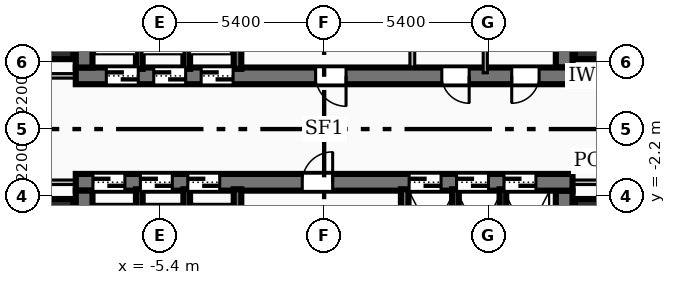
"""IFC4 building model, lengths in metres.
Left out: names, types, materials, properties, quantities, classifications, styles, units other than length and angle.
Written with IfcOpenShell. Run it as: python <this file> out.ifc"""

import sys

from ifc_helpers import new_model, si_unit, direction, frame, frame_2d, origin, origin_2d, place, context, subcontext, project, spatial, rectangle, extrude, element, fill, save


model = new_model("IFC4")
c1 = context("Model", 3, precision=1e-05, world=origin(), true_north=direction((0.0, 1.0)))
c2 = subcontext(c1, "Body", "Model", "MODEL_VIEW")
j1 = project(units=[si_unit("LENGTHUNIT", "METRE"), si_unit("PLANEANGLEUNIT", "RADIAN")], contexts=[c1])
p1 = place(None, origin())
s1 = spatial("IfcSite", under=j1, at=p1, CompositionType="ELEMENT")
p2 = place(p1, origin())
s2 = spatial("IfcBuilding", under=s1, at=p2, CompositionType="ELEMENT")
p3 = place(p2, origin())
s3 = spatial("IfcBuildingStorey", under=s2, at=p3, CompositionType="ELEMENT", Elevation=0.0)
p4 = place(p3, frame((8.17, 1.75, 0.0), z_axis=(0.0, 0.0, 1.0), x_axis=(-1.0, 0.0, 0.0)))
e1 = element("IfcWall", 1, at=p4, inside=s3, PredefinedType="SHEAR", context=c2, shape_type="SweptSolid", body=[
    extrude(rectangle(XDim=16.34, YDim=0.55, at=frame_2d((8.17, 0.0))), origin(), (0.0, 0.0, 1.0), 5.08),
])
p5 = place(p4, frame((7.45, 0.0, 0.0)))
e2 = element("IfcOpeningElement", 2, at=p5, cuts=e1, PredefinedType="OPENING", context=c2, shape_type="SweptSolid", body=[
    extrude(rectangle(XDim=1.0, YDim=2.1, at=frame_2d((0.5, 1.05))), frame((0.0, 0.285, 0.0), z_axis=(0.0, -1.0, 0.0), x_axis=(1.0, 0.0, 0.0)), (0.0, 0.0, 1.0), 0.57),
])
p6 = place(p4, frame((14.285, 0.0, 0.0)))
e3 = element("IfcOpeningElement", 3, at=p6, cuts=e1, PredefinedType="OPENING", context=c2, shape_type="SweptSolid", body=[
    extrude(rectangle(XDim=1.05, YDim=2.15, at=frame_2d((0.525, 1.075))), frame((0.0, 0.285, 0.0), z_axis=(0.0, -1.0, 0.0), x_axis=(1.0, 0.0, 0.0)), (0.0, 0.0, 1.0), 0.57),
])
p7 = place(p4, frame((12.725, 0.0, 0.0)))
e4 = element("IfcOpeningElement", 4, at=p7, cuts=e1, PredefinedType="OPENING", context=c2, shape_type="SweptSolid", body=[
    extrude(rectangle(XDim=1.05, YDim=2.15, at=frame_2d((0.525, 1.075))), frame((0.0, 0.285, 0.0), z_axis=(0.0, -1.0, 0.0), x_axis=(1.0, 0.0, 0.0)), (0.0, 0.0, 1.0), 0.57),
])
p8 = place(p4, frame((11.165, 0.0, 0.0)))
e5 = element("IfcOpeningElement", 5, at=p8, cuts=e1, PredefinedType="OPENING", context=c2, shape_type="SweptSolid", body=[
    extrude(rectangle(XDim=1.05, YDim=2.15, at=frame_2d((0.525, 1.075))), frame((0.0, 0.285, 0.0), z_axis=(0.0, -1.0, 0.0), x_axis=(1.0, 0.0, 0.0)), (0.0, 0.0, 1.0), 0.57),
])
p9 = place(p4, frame((3.4, 0.0, 0.0)))
e6 = element("IfcOpeningElement", 6, at=p9, cuts=e1, PredefinedType="OPENING", context=c2, shape_type="SweptSolid", body=[
    extrude(rectangle(XDim=0.9, YDim=2.06, at=frame_2d((0.45, 1.03))), frame((0.0, 0.285, 0.0), z_axis=(0.0, -1.0, 0.0), x_axis=(1.0, 0.0, 0.0)), (0.0, 0.0, 1.0), 0.57),
])
p10 = place(p4, frame((1.1, 0.0, 0.0)))
e7 = element("IfcOpeningElement", 7, at=p10, cuts=e1, PredefinedType="OPENING", context=c2, shape_type="SweptSolid", body=[
    extrude(rectangle(XDim=0.9, YDim=2.06, at=frame_2d((0.45, 1.03))), frame((0.0, 0.285, 0.0), z_axis=(0.0, -1.0, 0.0), x_axis=(1.0, 0.0, 0.0)), (0.0, 0.0, 1.0), 0.57),
])
for number, where, z_axis, x_axis in (
    (8, (-7.895, 2.025, 0.0), (0.0, 0.0, 1.0), (0.0, 1.0, 0.0)),
    (9, (7.895, 8.31, 0.0), (0.0, 0.0, 1.0), (0.0, -1.0, 0.0)),
):
    element("IfcWall", number, at=place(p3, frame(where, z_axis=z_axis, x_axis=x_axis)), inside=s3, PredefinedType="SHEAR", context=c2, shape_type="SweptSolid", body=[
        extrude(rectangle(XDim=6.285, YDim=0.55, at=frame_2d((3.143, 0.0))), origin(), (0.0, 0.0, 1.0), 5.08),
    ])
p11 = place(p3, frame((-8.17, -1.75, 0.0), z_axis=(0.0, 0.0, 1.0), x_axis=(1.0, 0.0, 0.0)))
e10 = element("IfcWall", 10, at=p11, inside=s3, PredefinedType="SHEAR", context=c2, shape_type="SweptSolid", body=[
    extrude(rectangle(XDim=16.34, YDim=0.55, at=frame_2d((8.17, 0.0))), origin(), (0.0, 0.0, 1.0), 5.08),
])
p12 = place(p11, frame((7.45, 0.0, 0.0)))
e11 = element("IfcOpeningElement", 11, at=p12, cuts=e10, PredefinedType="OPENING", context=c2, shape_type="SweptSolid", body=[
    extrude(rectangle(XDim=1.0, YDim=2.1, at=frame_2d((0.5, 1.05))), frame((0.0, 0.285, 0.0), z_axis=(0.0, -1.0, 0.0), x_axis=(1.0, 0.0, 0.0)), (0.0, 0.0, 1.0), 0.57),
])
p13 = place(p11, frame((10.965, 0.0, 0.0)))
e12 = element("IfcOpeningElement", 12, at=p13, cuts=e10, PredefinedType="OPENING", context=c2, shape_type="SweptSolid", body=[
    extrude(rectangle(XDim=1.05, YDim=2.15, at=frame_2d((0.525, 1.075))), frame((0.0, 0.285, 0.0), z_axis=(0.0, -1.0, 0.0), x_axis=(1.0, 0.0, 0.0)), (0.0, 0.0, 1.0), 0.57),
])
p14 = place(p11, frame((12.525, 0.0, 0.0)))
e13 = element("IfcOpeningElement", 13, at=p14, cuts=e10, PredefinedType="OPENING", context=c2, shape_type="SweptSolid", body=[
    extrude(rectangle(XDim=1.05, YDim=2.15, at=frame_2d((0.525, 1.075))), frame((0.0, 0.285, 0.0), z_axis=(0.0, -1.0, 0.0), x_axis=(1.0, 0.0, 0.0)), (0.0, 0.0, 1.0), 0.57),
])
p15 = place(p11, frame((14.085, 0.0, 0.0)))
e14 = element("IfcOpeningElement", 14, at=p15, cuts=e10, PredefinedType="OPENING", context=c2, shape_type="SweptSolid", body=[
    extrude(rectangle(XDim=1.05, YDim=2.15, at=frame_2d((0.525, 1.075))), frame((0.0, 0.285, 0.0), z_axis=(0.0, -1.0, 0.0), x_axis=(1.0, 0.0, 0.0)), (0.0, 0.0, 1.0), 0.57),
])
p16 = place(p11, frame((0.565, 0.0, 0.0)))
e15 = element("IfcOpeningElement", 15, at=p16, cuts=e10, PredefinedType="OPENING", context=c2, shape_type="SweptSolid", body=[
    extrude(rectangle(XDim=1.05, YDim=2.15, at=frame_2d((0.525, 1.075))), frame((0.0, 0.285, 0.0), z_axis=(0.0, -1.0, 0.0), x_axis=(1.0, 0.0, 0.0)), (0.0, 0.0, 1.0), 0.57),
])
p17 = place(p11, frame((2.125, 0.0, 0.0)))
e16 = element("IfcOpeningElement", 16, at=p17, cuts=e10, PredefinedType="OPENING", context=c2, shape_type="SweptSolid", body=[
    extrude(rectangle(XDim=1.05, YDim=2.15, at=frame_2d((0.525, 1.075))), frame((0.0, 0.285, 0.0), z_axis=(0.0, -1.0, 0.0), x_axis=(1.0, 0.0, 0.0)), (0.0, 0.0, 1.0), 0.57),
])
p18 = place(p11, frame((3.685, 0.0, 0.0)))
e17 = element("IfcOpeningElement", 17, at=p18, cuts=e10, PredefinedType="OPENING", context=c2, shape_type="SweptSolid", body=[
    extrude(rectangle(XDim=1.05, YDim=2.15, at=frame_2d((0.525, 1.075))), frame((0.0, 0.285, 0.0), z_axis=(0.0, -1.0, 0.0), x_axis=(1.0, 0.0, 0.0)), (0.0, 0.0, 1.0), 0.57),
])
for number, where, z_axis, x_axis in (
    (18, (-7.895, -8.31, 0.0), (0.0, 0.0, 1.0), (0.0, 1.0, 0.0)),
    (19, (7.895, -2.025, 0.0), (0.0, 0.0, 1.0), (0.0, -1.0, 0.0)),
):
    element("IfcWall", number, at=place(p3, frame(where, z_axis=z_axis, x_axis=x_axis)), inside=s3, PredefinedType="SHEAR", context=c2, shape_type="SweptSolid", body=[
        extrude(rectangle(XDim=6.285, YDim=0.55, at=frame_2d((3.143, 0.0))), origin(), (0.0, 0.0, 1.0), 5.08),
    ])
for number, where, z_axis, x_axis in (
    (20, (-2.85, 1.98, 0.0), (0.0, 0.0, 1.0), (0.0, 1.0, 0.0)),
    (21, (-2.85, -5.05, 0.0), (0.0, 0.0, 1.0), (0.0, 1.0, 0.0)),
    (22, (2.65, -5.05, 0.0), (0.0, 0.0, 1.0), (0.0, 1.0, 0.0)),
):
    element("IfcWall", number, at=place(p3, frame(where, z_axis=z_axis, x_axis=x_axis)), inside=s3, PredefinedType="SOLIDWALL", context=c2, shape_type="SweptSolid", body=[
        extrude(rectangle(XDim=3.07, YDim=0.25, at=frame_2d((1.535, 0.0))), origin(), (0.0, 0.0, 1.0), 5.08),
    ])
for number, where, z_axis, x_axis in (
    (23, (-6.08, 1.98, 0.0), (0.0, 0.0, 1.0), (0.0, 1.0, 0.0)),
    (24, (-4.52, 1.98, 0.0), (0.0, 0.0, 1.0), (0.0, 1.0, 0.0)),
    (25, (4.32, -5.05, 0.0), (0.0, 0.0, 1.0), (0.0, 1.0, 0.0)),
    (26, (5.88, -5.05, 0.0), (0.0, 0.0, 1.0), (0.0, 1.0, 0.0)),
    (27, (-6.08, -5.05, 0.0), (0.0, 0.0, 1.0), (0.0, 1.0, 0.0)),
    (28, (-4.52, -5.05, 0.0), (0.0, 0.0, 1.0), (0.0, 1.0, 0.0)),
):
    element("IfcWall", number, at=place(p3, frame(where, z_axis=z_axis, x_axis=x_axis)), inside=s3, PredefinedType="SOLIDWALL", context=c2, shape_type="SweptSolid", body=[
        extrude(rectangle(XDim=3.07, YDim=0.22, at=frame_2d((1.535, 0.0))), origin(), (0.0, 0.0, 1.0), 5.08),
    ])
for number, where, z_axis, x_axis in (
    (29, (-8.85, -2.9, 0.0), (0.0, 0.0, 1.0), (1.0, 0.0, 0.0)),
    (30, (-8.85, 2.9, 0.0), (0.0, 0.0, 1.0), (1.0, 0.0, 0.0)),
    (31, (8.85, -2.9, 0.0), (0.0, 0.0, 1.0), (1.0, 0.0, 0.0)),
    (32, (8.85, 2.9, 0.0), (0.0, 0.0, 1.0), (1.0, 0.0, 0.0)),
):
    element("IfcColumn", number, at=place(p3, frame(where, z_axis=z_axis, x_axis=x_axis)), inside=s3, PredefinedType="COLUMN", context=c2, shape_type="SweptSolid", body=[
        extrude(rectangle(XDim=1.2, YDim=1.2, at=origin_2d()), origin(), (0.0, 0.0, 1.0), 5.4),
    ])
p19 = place(p3, frame((2.9, 2.04, 0.0), z_axis=(0.0, 0.0, 1.0), x_axis=(0.0, 1.0, 0.0)))
e33 = element("IfcWall", 33, at=p19, inside=s3, PredefinedType="PARTITIONING", context=c2, shape_type="SweptSolid", body=[
    extrude(rectangle(XDim=2.94, YDim=0.16, at=frame_2d((1.47, 0.0))), origin(), (0.0, 0.0, 1.0), 4.145),
])
p20 = place(p19, frame((1.82, 0.0, 0.0)))
e34 = element("IfcOpeningElement", 34, at=p20, cuts=e33, PredefinedType="OPENING", context=c2, shape_type="SweptSolid", body=[
    extrude(rectangle(XDim=0.9, YDim=2.06, at=frame_2d((0.45, 1.03))), frame((0.0, 0.09, 0.0), z_axis=(0.0, -1.0, 0.0), x_axis=(1.0, 0.0, 0.0)), (0.0, 0.0, 1.0), 0.18),
])
p21 = place(p3, frame((5.3, 1.85, 0.0), z_axis=(0.0, 0.0, 1.0), x_axis=(0.0, 1.0, 0.0)))
e35 = element("IfcWall", 35, at=p21, inside=s3, PredefinedType="PARTITIONING", context=c2, shape_type="SweptSolid", body=[
    extrude(rectangle(XDim=1.89, YDim=0.138, at=frame_2d((0.945, 0.0))), origin(), (0.0, 0.0, 1.0), 4.145),
])
for number, where, z_axis, x_axis in (
    (36, (-7.85, 1.75, 0.0), (0.0, 0.0, 1.0), (-1.0, 0.0, 0.0)),
    (37, (-7.85, -1.75, 0.0), (0.0, 0.0, 1.0), (-1.0, 0.0, 0.0)),
    (38, (7.85, 1.75, 0.0), (0.0, 0.0, 1.0), (1.0, 0.0, 0.0)),
    (39, (7.85, -1.75, 0.0), (0.0, 0.0, 1.0), (1.0, 0.0, 0.0)),
):
    element("IfcWall", number, at=place(p3, frame(where, z_axis=z_axis, x_axis=x_axis)), inside=s3, PredefinedType="PARTITIONING", context=c2, shape_type="SweptSolid", body=[
        extrude(rectangle(XDim=1.67, YDim=0.15, at=frame_2d((0.835, 0.0))), origin(), (0.0, 0.0, 1.0), 4.145),
    ])
p22 = place(p5, origin())
e40 = element("IfcDoor", 40, at=p22, inside=s3, OperationType="SINGLE_SWING_LEFT", PredefinedType="DOOR", context=c2, shape_type="SweptSolid", body=[
    extrude(rectangle(XDim=1.0, YDim=2.1, at=frame_2d((0.5, 1.05))), frame((0.0, 0.025, 0.0), z_axis=(0.0, -1.0, 0.0), x_axis=(1.0, 0.0, 0.0)), (0.0, 0.0, 1.0), 0.05),
])
fill(e2, e40)
p23 = place(p12, origin())
e41 = element("IfcDoor", 41, at=p23, inside=s3, OperationType="SINGLE_SWING_RIGHT", PredefinedType="DOOR", context=c2, shape_type="SweptSolid", body=[
    extrude(rectangle(XDim=1.0, YDim=2.1, at=frame_2d((0.5, 1.05))), frame((0.0, 0.025, 0.0), z_axis=(0.0, -1.0, 0.0), x_axis=(1.0, 0.0, 0.0)), (0.0, 0.0, 1.0), 0.05),
])
fill(e11, e41)
p24 = place(p6, origin())
e42 = element("IfcDoor", 42, at=p24, inside=s3, OperationType="DOUBLE_DOOR_SLIDING", PredefinedType="DOOR", context=c2, shape_type="SweptSolid", body=[
    extrude(rectangle(XDim=1.05, YDim=2.15, at=frame_2d((0.525, 1.075))), frame((0.0, 0.025, 0.0), z_axis=(0.0, -1.0, 0.0), x_axis=(1.0, 0.0, 0.0)), (0.0, 0.0, 1.0), 0.05),
])
fill(e3, e42)
p25 = place(p7, origin())
e43 = element("IfcDoor", 43, at=p25, inside=s3, OperationType="DOUBLE_DOOR_SLIDING", PredefinedType="DOOR", context=c2, shape_type="SweptSolid", body=[
    extrude(rectangle(XDim=1.05, YDim=2.15, at=frame_2d((0.525, 1.075))), frame((0.0, 0.025, 0.0), z_axis=(0.0, -1.0, 0.0), x_axis=(1.0, 0.0, 0.0)), (0.0, 0.0, 1.0), 0.05),
])
fill(e4, e43)
p26 = place(p8, origin())
e44 = element("IfcDoor", 44, at=p26, inside=s3, OperationType="DOUBLE_DOOR_SLIDING", PredefinedType="DOOR", context=c2, shape_type="SweptSolid", body=[
    extrude(rectangle(XDim=1.05, YDim=2.15, at=frame_2d((0.525, 1.075))), frame((0.0, 0.025, 0.0), z_axis=(0.0, -1.0, 0.0), x_axis=(1.0, 0.0, 0.0)), (0.0, 0.0, 1.0), 0.05),
])
fill(e5, e44)
p27 = place(p13, origin())
e45 = element("IfcDoor", 45, at=p27, inside=s3, OperationType="DOUBLE_DOOR_SLIDING", PredefinedType="DOOR", context=c2, shape_type="SweptSolid", body=[
    extrude(rectangle(XDim=1.05, YDim=2.15, at=frame_2d((0.525, 1.075))), frame((0.0, 0.025, 0.0), z_axis=(0.0, -1.0, 0.0), x_axis=(1.0, 0.0, 0.0)), (0.0, 0.0, 1.0), 0.05),
])
fill(e12, e45)
p28 = place(p14, origin())
e46 = element("IfcDoor", 46, at=p28, inside=s3, OperationType="DOUBLE_DOOR_SLIDING", PredefinedType="DOOR", context=c2, shape_type="SweptSolid", body=[
    extrude(rectangle(XDim=1.05, YDim=2.15, at=frame_2d((0.525, 1.075))), frame((0.0, 0.025, 0.0), z_axis=(0.0, -1.0, 0.0), x_axis=(1.0, 0.0, 0.0)), (0.0, 0.0, 1.0), 0.05),
])
fill(e13, e46)
p29 = place(p15, origin())
e47 = element("IfcDoor", 47, at=p29, inside=s3, OperationType="DOUBLE_DOOR_SLIDING", PredefinedType="DOOR", context=c2, shape_type="SweptSolid", body=[
    extrude(rectangle(XDim=1.05, YDim=2.15, at=frame_2d((0.525, 1.075))), frame((0.0, 0.025, 0.0), z_axis=(0.0, -1.0, 0.0), x_axis=(1.0, 0.0, 0.0)), (0.0, 0.0, 1.0), 0.05),
])
fill(e14, e47)
p30 = place(p16, origin())
e48 = element("IfcDoor", 48, at=p30, inside=s3, OperationType="DOUBLE_DOOR_SLIDING", PredefinedType="DOOR", context=c2, shape_type="SweptSolid", body=[
    extrude(rectangle(XDim=1.05, YDim=2.15, at=frame_2d((0.525, 1.075))), frame((0.0, 0.025, 0.0), z_axis=(0.0, -1.0, 0.0), x_axis=(1.0, 0.0, 0.0)), (0.0, 0.0, 1.0), 0.05),
])
fill(e15, e48)
p31 = place(p17, origin())
e49 = element("IfcDoor", 49, at=p31, inside=s3, OperationType="DOUBLE_DOOR_SLIDING", PredefinedType="DOOR", context=c2, shape_type="SweptSolid", body=[
    extrude(rectangle(XDim=1.05, YDim=2.15, at=frame_2d((0.525, 1.075))), frame((0.0, 0.025, 0.0), z_axis=(0.0, -1.0, 0.0), x_axis=(1.0, 0.0, 0.0)), (0.0, 0.0, 1.0), 0.05),
])
fill(e16, e49)
p32 = place(p18, origin())
e50 = element("IfcDoor", 50, at=p32, inside=s3, OperationType="DOUBLE_DOOR_SLIDING", PredefinedType="DOOR", context=c2, shape_type="SweptSolid", body=[
    extrude(rectangle(XDim=1.05, YDim=2.15, at=frame_2d((0.525, 1.075))), frame((0.0, 0.025, 0.0), z_axis=(0.0, -1.0, 0.0), x_axis=(1.0, 0.0, 0.0)), (0.0, 0.0, 1.0), 0.05),
])
fill(e17, e50)
p33 = place(p9, origin())
e51 = element("IfcDoor", 51, at=p33, inside=s3, OperationType="SINGLE_SWING_LEFT", PredefinedType="DOOR", context=c2, shape_type="SweptSolid", body=[
    extrude(rectangle(XDim=0.9, YDim=2.06, at=frame_2d((0.45, 1.03))), frame((0.0, 0.025, 0.0), z_axis=(0.0, -1.0, 0.0), x_axis=(1.0, 0.0, 0.0)), (0.0, 0.0, 1.0), 0.05),
])
fill(e6, e51)
p34 = place(p10, origin())
e52 = element("IfcDoor", 52, at=p34, inside=s3, OperationType="SINGLE_SWING_RIGHT", PredefinedType="DOOR", context=c2, shape_type="SweptSolid", body=[
    extrude(rectangle(XDim=0.9, YDim=2.06, at=frame_2d((0.45, 1.03))), frame((0.0, 0.025, 0.0), z_axis=(0.0, -1.0, 0.0), x_axis=(1.0, 0.0, 0.0)), (0.0, 0.0, 1.0), 0.05),
])
fill(e7, e52)
save(model, sys.argv[1])
